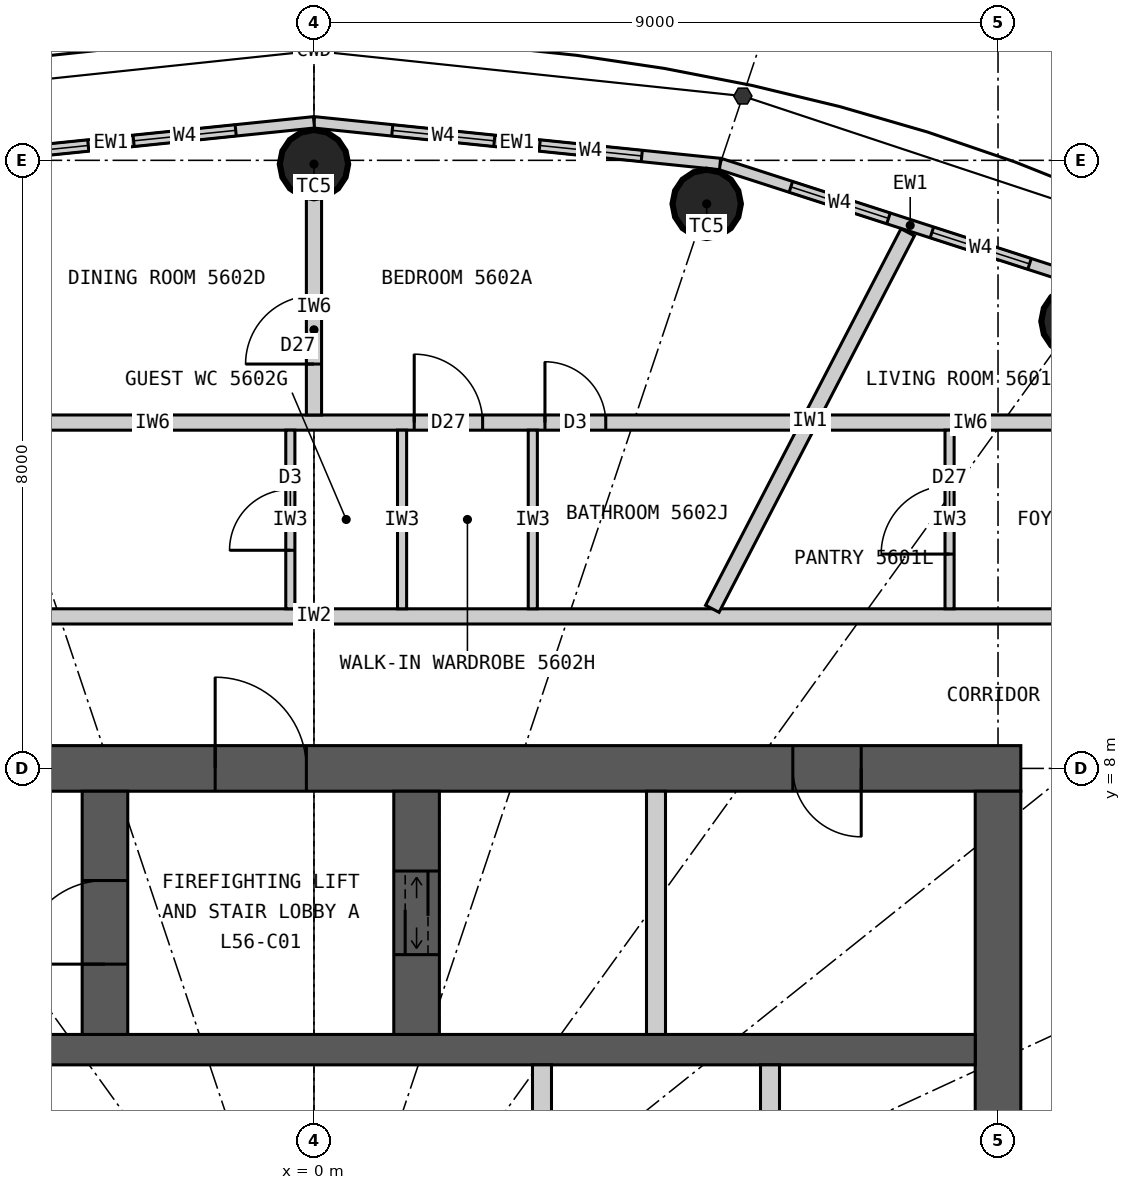
"""IFC4 building model, lengths in metres.
Left out: names, types, materials, properties, quantities, classifications, styles, units other than length and angle.
Written with IfcOpenShell. Run it as: python <this file> out.ifc"""

import sys

from ifc_helpers import new_model, si_unit, direction, frame, frame_2d, origin, origin_2d, place, context, subcontext, project, spatial, rectangle, circle, extrude, element, fill, save


model = new_model("IFC4")
c1 = context("Model", 3, precision=1e-05, world=origin(), true_north=direction((0.0, 1.0)))
c2 = subcontext(c1, "Body", "Model", "MODEL_VIEW")
j1 = project(units=[si_unit("LENGTHUNIT", "METRE"), si_unit("PLANEANGLEUNIT", "RADIAN")], contexts=[c1])
p1 = place(None, origin())
s1 = spatial("IfcSite", under=j1, at=p1, CompositionType="ELEMENT")
p2 = place(p1, origin())
s2 = spatial("IfcBuilding", under=s1, at=p2, CompositionType="ELEMENT")
p3 = place(p2, frame((0.0, 0.0, 209.4)))
s3 = spatial("IfcBuildingStorey", under=s2, at=p3, CompositionType="ELEMENT", Elevation=209.4)
for number, where, z_axis, x_axis in (
    (1, (10.019, 13.883, 0.0), (0.0, 0.0, 1.0), (1.0, 0.0, 0.0)),
    (2, (5.167, 15.427, 0.0), (0.0, 0.0, 1.0), (1.0, 0.0, 0.0)),
    (3, (0.0, 15.95, 0.0), (0.0, 0.0, 1.0), (1.0, 0.0, 0.0)),
):
    element("IfcColumn", number, at=place(p3, frame(where, z_axis=z_axis, x_axis=x_axis)), inside=s3, PredefinedType="COLUMN", context=c2, shape_type="SweptSolid", body=[
        extrude(circle(Radius=0.45, at=origin_2d()), origin(), (0.0, 0.0, 1.0), 3.3),
    ])
p4 = place(p3, frame((-9.3, 8.0, 0.0), z_axis=(0.0, 0.0, 1.0), x_axis=(1.0, 0.0, 0.0)))
e4 = element("IfcWall", 4, at=p4, inside=s3, PredefinedType="SHEAR", context=c2, shape_type="SweptSolid", body=[
    extrude(rectangle(XDim=18.6, YDim=0.6, at=frame_2d((9.3, 0.0))), origin(), (0.0, 0.0, 1.0), 3.3),
])
p5 = place(p4, frame((8.0, 0.0, 0.0)))
e5 = element("IfcOpeningElement", 5, at=p5, cuts=e4, PredefinedType="OPENING", context=c2, shape_type="SweptSolid", body=[
    extrude(rectangle(XDim=1.2, YDim=2.2, at=frame_2d((0.6, 1.1))), frame((0.0, 0.31, 0.0), z_axis=(0.0, -1.0, 0.0), x_axis=(1.0, 0.0, 0.0)), (0.0, 0.0, 1.0), 0.62),
])
p6 = place(p4, frame((15.6, 0.0, 0.0)))
e6 = element("IfcOpeningElement", 6, at=p6, cuts=e4, PredefinedType="OPENING", context=c2, shape_type="SweptSolid", body=[
    extrude(rectangle(XDim=0.9, YDim=2.2, at=frame_2d((0.45, 1.1))), frame((0.0, 0.31, 0.0), z_axis=(0.0, -1.0, 0.0), x_axis=(1.0, 0.0, 0.0)), (0.0, 0.0, 1.0), 0.62),
])
p7 = place(p3, frame((9.0, -7.7, 0.0), z_axis=(0.0, 0.0, 1.0), x_axis=(0.0, 1.0, 0.0)))
e7 = element("IfcWall", 7, at=p7, inside=s3, PredefinedType="SHEAR", context=c2, shape_type="SweptSolid", body=[
    extrude(rectangle(XDim=15.4, YDim=0.6, at=frame_2d((7.7, 0.0))), origin(), (0.0, 0.0, 1.0), 3.3),
])
p8 = place(p7, frame((6.8, 0.0, 0.0)))
e8 = element("IfcOpeningElement", 8, at=p8, cuts=e7, PredefinedType="OPENING", context=c2, shape_type="SweptSolid", body=[
    extrude(rectangle(XDim=1.8, YDim=2.2, at=frame_2d((0.9, 1.1))), frame((0.0, 0.31, 0.0), z_axis=(0.0, -1.0, 0.0), x_axis=(1.0, 0.0, 0.0)), (0.0, 0.0, 1.0), 0.62),
])
p9 = place(p3, frame((-8.7, 4.3, 0.0), z_axis=(0.0, 0.0, 1.0), x_axis=(1.0, 0.0, 0.0)))
e9 = element("IfcWall", 9, at=p9, inside=s3, PredefinedType="SHEAR", context=c2, shape_type="SweptSolid", body=[
    extrude(rectangle(XDim=17.4, YDim=0.4, at=frame_2d((8.7, 0.0))), origin(), (0.0, 0.0, 1.0), 3.3),
])
p10 = place(p3, frame((-2.75, 4.5, 0.0), z_axis=(0.0, 0.0, 1.0), x_axis=(0.0, 1.0, 0.0)))
e10 = element("IfcWall", 10, at=p10, inside=s3, PredefinedType="SHEAR", context=c2, shape_type="SweptSolid", body=[
    extrude(rectangle(XDim=3.2, YDim=0.6, at=frame_2d((1.6, 0.0))), origin(), (0.0, 0.0, 1.0), 3.3),
])
p11 = place(p10, frame((0.925, 0.0, 0.0)))
e11 = element("IfcOpeningElement", 11, at=p11, cuts=e10, PredefinedType="OPENING", context=c2, shape_type="SweptSolid", body=[
    extrude(rectangle(XDim=1.1, YDim=2.2, at=frame_2d((0.55, 1.1))), frame((0.0, 0.31, 0.0), z_axis=(0.0, -1.0, 0.0), x_axis=(1.0, 0.0, 0.0)), (0.0, 0.0, 1.0), 0.62),
])
p12 = place(p3, frame((1.35, 4.5, 0.0), z_axis=(0.0, 0.0, 1.0), x_axis=(0.0, 1.0, 0.0)))
e12 = element("IfcWall", 12, at=p12, inside=s3, PredefinedType="SHEAR", context=c2, shape_type="SweptSolid", body=[
    extrude(rectangle(XDim=3.2, YDim=0.6, at=frame_2d((1.6, 0.0))), origin(), (0.0, 0.0, 1.0), 3.3),
])
p13 = place(p12, frame((1.05, 0.0, 0.0)))
e13 = element("IfcOpeningElement", 13, at=p13, cuts=e12, PredefinedType="OPENING", context=c2, shape_type="SweptSolid", body=[
    extrude(rectangle(XDim=1.1, YDim=2.2, at=frame_2d((0.55, 1.1))), frame((0.0, 0.31, 0.0), z_axis=(0.0, -1.0, 0.0), x_axis=(1.0, 0.0, 0.0)), (0.0, 0.0, 1.0), 0.62),
])
p14 = place(p3, frame((4.5, 4.5, 0.0), z_axis=(0.0, 0.0, 1.0), x_axis=(0.0, 1.0, 0.0)))
e14 = element("IfcWall", 14, at=p14, inside=s3, PredefinedType="PARTITIONING", context=c2, shape_type="SweptSolid", body=[
    extrude(rectangle(XDim=3.2, YDim=0.25, at=frame_2d((1.6, 0.0))), origin(), (0.0, 0.0, 1.0), 3.3),
])
for number, where, z_axis, x_axis in (
    (15, (3.0, 1.75, 0.0), (0.0, 0.0, 1.0), (0.0, 1.0, 0.0)),
    (16, (6.0, 1.75, 0.0), (0.0, 0.0, 1.0), (0.0, 1.0, 0.0)),
):
    element("IfcWall", number, at=place(p3, frame(where, z_axis=z_axis, x_axis=x_axis)), inside=s3, PredefinedType="PARTITIONING", context=c2, shape_type="SweptSolid", body=[
        extrude(rectangle(XDim=2.35, YDim=0.25, at=frame_2d((1.175, 0.0))), origin(), (0.0, 0.0, 1.0), 3.3),
    ])
p15 = place(p3, frame((10.346, 14.336, 0.0), z_axis=(0.0, 0.0, 1.0), x_axis=(-0.951644702515, 0.307200846638, 0.0)))
e17 = element("IfcWall", 17, at=p15, inside=s3, PredefinedType="ELEMENTEDWALL", context=c2, shape_type="SweptSolid", body=[
    extrude(rectangle(XDim=5.258, YDim=0.15, at=frame_2d((2.629, 0.0))), origin(), (0.0, 0.0, 1.0), 3.12),
])
p16 = place(p15, frame((0.979, 0.0, 0.9)))
e18 = element("IfcOpeningElement", 18, at=p16, cuts=e17, PredefinedType="OPENING", context=c2, shape_type="SweptSolid", body=[
    extrude(rectangle(XDim=1.35, YDim=1.9, at=frame_2d((0.675, 0.95))), frame((0.0, 0.085, 0.0), z_axis=(0.0, -1.0, 0.0), x_axis=(1.0, 0.0, 0.0)), (0.0, 0.0, 1.0), 0.17),
])
p17 = place(p15, frame((2.929, 0.0, 0.9)))
e19 = element("IfcOpeningElement", 19, at=p17, cuts=e17, PredefinedType="OPENING", context=c2, shape_type="SweptSolid", body=[
    extrude(rectangle(XDim=1.35, YDim=1.9, at=frame_2d((0.675, 0.95))), frame((0.0, 0.085, 0.0), z_axis=(0.0, -1.0, 0.0), x_axis=(1.0, 0.0, 0.0)), (0.0, 0.0, 1.0), 0.17),
])
p18 = place(p3, frame((5.343, 15.952, 0.0), z_axis=(0.0, 0.0, 1.0), x_axis=(-0.994774574972, 0.102095763818, 0.0)))
e20 = element("IfcWall", 20, at=p18, inside=s3, PredefinedType="ELEMENTEDWALL", context=c2, shape_type="SweptSolid", body=[
    extrude(rectangle(XDim=5.371, YDim=0.15, at=frame_2d((2.686, 0.0))), origin(), (0.0, 0.0, 1.0), 3.12),
])
p19 = place(p18, frame((1.035, 0.0, 0.9)))
e21 = element("IfcOpeningElement", 21, at=p19, cuts=e20, PredefinedType="OPENING", context=c2, shape_type="SweptSolid", body=[
    extrude(rectangle(XDim=1.35, YDim=1.9, at=frame_2d((0.675, 0.95))), frame((0.0, 0.085, 0.0), z_axis=(0.0, -1.0, 0.0), x_axis=(1.0, 0.0, 0.0)), (0.0, 0.0, 1.0), 0.17),
])
p20 = place(p18, frame((2.985, 0.0, 0.9)))
e22 = element("IfcOpeningElement", 22, at=p20, cuts=e20, PredefinedType="OPENING", context=c2, shape_type="SweptSolid", body=[
    extrude(rectangle(XDim=1.35, YDim=1.9, at=frame_2d((0.675, 0.95))), frame((0.0, 0.085, 0.0), z_axis=(0.0, -1.0, 0.0), x_axis=(1.0, 0.0, 0.0)), (0.0, 0.0, 1.0), 0.17),
])
p21 = place(p3, frame((0.0, 16.5, 0.0), z_axis=(0.0, 0.0, 1.0), x_axis=(-0.994774574972, -0.102095763818, 0.0)))
e23 = element("IfcWall", 23, at=p21, inside=s3, PredefinedType="ELEMENTEDWALL", context=c2, shape_type="SweptSolid", body=[
    extrude(rectangle(XDim=5.371, YDim=0.15, at=frame_2d((2.686, 0.0))), origin(), (0.0, 0.0, 1.0), 3.12),
])
p22 = place(p21, frame((1.035, 0.0, 0.9)))
e24 = element("IfcOpeningElement", 24, at=p22, cuts=e23, PredefinedType="OPENING", context=c2, shape_type="SweptSolid", body=[
    extrude(rectangle(XDim=1.35, YDim=1.9, at=frame_2d((0.675, 0.95))), frame((0.0, 0.085, 0.0), z_axis=(0.0, -1.0, 0.0), x_axis=(1.0, 0.0, 0.0)), (0.0, 0.0, 1.0), 0.17),
])
p23 = place(p21, frame((2.985, 0.0, 0.9)))
e25 = element("IfcOpeningElement", 25, at=p23, cuts=e23, PredefinedType="OPENING", context=c2, shape_type="SweptSolid", body=[
    extrude(rectangle(XDim=1.35, YDim=1.9, at=frame_2d((0.675, 0.95))), frame((0.0, 0.085, 0.0), z_axis=(0.0, -1.0, 0.0), x_axis=(1.0, 0.0, 0.0)), (0.0, 0.0, 1.0), 0.17),
])
p24 = place(p3, frame((-11.1, 10.0, 0.0), z_axis=(0.0, 0.0, 1.0), x_axis=(1.0, 0.0, 0.0)))
e26 = element("IfcWall", 26, at=p24, inside=s3, PredefinedType="PARTITIONING", context=c2, shape_type="SweptSolid", body=[
    extrude(rectangle(XDim=22.2, YDim=0.2, at=frame_2d((11.1, 0.0))), origin(), (0.0, 0.0, 1.0), 3.12),
])
p25 = place(p24, frame((20.9, 0.0, 0.0)))
e27 = element("IfcOpeningElement", 27, at=p25, cuts=e26, PredefinedType="OPENING", context=c2, shape_type="SweptSolid", body=[
    extrude(rectangle(XDim=1.0, YDim=2.2, at=frame_2d((0.5, 1.1))), frame((0.0, 0.11, 0.0), z_axis=(0.0, -1.0, 0.0), x_axis=(1.0, 0.0, 0.0)), (0.0, 0.0, 1.0), 0.22),
])
p26 = place(p24, frame((4.329, 0.0, 0.0)))
e28 = element("IfcOpeningElement", 28, at=p26, cuts=e26, PredefinedType="OPENING", context=c2, shape_type="SweptSolid", body=[
    extrude(rectangle(XDim=1.0, YDim=2.2, at=frame_2d((0.5, 1.1))), frame((0.0, 0.11, 0.0), z_axis=(0.0, -1.0, 0.0), x_axis=(1.0, 0.0, 0.0)), (0.0, 0.0, 1.0), 0.22),
])
p27 = place(p3, frame((5.241, 10.1, 0.0), z_axis=(0.0, 0.0, 1.0), x_axis=(0.460603196597, 0.887606160008, 0.0)))
e29 = element("IfcWall", 29, at=p27, inside=s3, PredefinedType="PARTITIONING", context=c2, shape_type="SweptSolid", body=[
    extrude(rectangle(XDim=5.58, YDim=0.2, at=frame_2d((2.79, 0.0))), origin(), (0.0, 0.0, 1.0), 3.12),
])
p28 = place(p3, frame((10.609, 12.55, 0.0), z_axis=(0.0, 0.0, 1.0), x_axis=(-1.0, 0.0, 0.0)))
e30 = element("IfcWall", 30, at=p28, inside=s3, PredefinedType="PARTITIONING", context=c2, shape_type="SweptSolid", body=[
    extrude(rectangle(XDim=3.947, YDim=0.2, at=frame_2d((1.974, 0.0))), origin(), (0.0, 0.0, 1.0), 3.12),
])
p29 = place(p3, frame((8.363, 10.1, 0.0), z_axis=(0.0, 0.0, 1.0), x_axis=(0.0, 1.0, 0.0)))
e31 = element("IfcWall", 31, at=p29, inside=s3, PredefinedType="PARTITIONING", context=c2, shape_type="SweptSolid", body=[
    extrude(rectangle(XDim=2.35, YDim=0.12, at=frame_2d((1.175, 0.0))), origin(), (0.0, 0.0, 1.0), 3.12),
])
p30 = place(p29, frame((0.72, 0.0, 0.0)))
e32 = element("IfcOpeningElement", 32, at=p30, cuts=e31, PredefinedType="OPENING", context=c2, shape_type="SweptSolid", body=[
    extrude(rectangle(XDim=0.9, YDim=2.1, at=frame_2d((0.45, 1.05))), frame((0.0, 0.07, 0.0), z_axis=(0.0, -1.0, 0.0), x_axis=(1.0, 0.0, 0.0)), (0.0, 0.0, 1.0), 0.14),
])
p31 = place(p3, frame((6.364, 12.55, 0.0), z_axis=(0.0, 0.0, 1.0), x_axis=(-1.0, 0.0, 0.0)))
e33 = element("IfcWall", 33, at=p31, inside=s3, PredefinedType="PARTITIONING", context=c2, shape_type="SweptSolid", body=[
    extrude(rectangle(XDim=16.972, YDim=0.2, at=frame_2d((8.486, 0.0))), origin(), (0.0, 0.0, 1.0), 3.12),
])
p32 = place(p31, frame((2.525, 0.0, 0.0)))
e34 = element("IfcOpeningElement", 34, at=p32, cuts=e33, PredefinedType="OPENING", context=c2, shape_type="SweptSolid", body=[
    extrude(rectangle(XDim=0.8, YDim=2.1, at=frame_2d((0.4, 1.05))), frame((0.0, 0.11, 0.0), z_axis=(0.0, -1.0, 0.0), x_axis=(1.0, 0.0, 0.0)), (0.0, 0.0, 1.0), 0.22),
])
p33 = place(p31, frame((4.145, 0.0, 0.0)))
e35 = element("IfcOpeningElement", 35, at=p33, cuts=e33, PredefinedType="OPENING", context=c2, shape_type="SweptSolid", body=[
    extrude(rectangle(XDim=0.9, YDim=2.1, at=frame_2d((0.45, 1.05))), frame((0.0, 0.11, 0.0), z_axis=(0.0, -1.0, 0.0), x_axis=(1.0, 0.0, 0.0)), (0.0, 0.0, 1.0), 0.22),
])
p34 = place(p31, frame((13.52, 0.0, 0.0)))
e36 = element("IfcOpeningElement", 36, at=p34, cuts=e33, PredefinedType="OPENING", context=c2, shape_type="SweptSolid", body=[
    extrude(rectangle(XDim=0.9, YDim=2.1, at=frame_2d((0.45, 1.05))), frame((0.0, 0.11, 0.0), z_axis=(0.0, -1.0, 0.0), x_axis=(1.0, 0.0, 0.0)), (0.0, 0.0, 1.0), 0.22),
])
p35 = place(p3, frame((0.0, 12.65, 0.0), z_axis=(0.0, 0.0, 1.0), x_axis=(0.0, 1.0, 0.0)))
e37 = element("IfcWall", 37, at=p35, inside=s3, PredefinedType="PARTITIONING", context=c2, shape_type="SweptSolid", body=[
    extrude(rectangle(XDim=2.85, YDim=0.2, at=frame_2d((1.425, 0.0))), origin(), (0.0, 0.0, 1.0), 2.42),
])
p36 = place(p35, frame((0.67, 0.0, 0.0)))
e38 = element("IfcOpeningElement", 38, at=p36, cuts=e37, PredefinedType="OPENING", context=c2, shape_type="SweptSolid", body=[
    extrude(rectangle(XDim=0.9, YDim=2.1, at=frame_2d((0.45, 1.05))), frame((0.0, 0.11, 0.0), z_axis=(0.0, -1.0, 0.0), x_axis=(1.0, 0.0, 0.0)), (0.0, 0.0, 1.0), 0.22),
])
for number, where, z_axis, x_axis in (
    (39, (2.879, 10.1, 0.0), (0.0, 0.0, 1.0), (0.0, 1.0, 0.0)),
    (40, (1.159, 10.1, 0.0), (0.0, 0.0, 1.0), (0.0, 1.0, 0.0)),
):
    element("IfcWall", number, at=place(p3, frame(where, z_axis=z_axis, x_axis=x_axis)), inside=s3, PredefinedType="PARTITIONING", context=c2, shape_type="SweptSolid", body=[
        extrude(rectangle(XDim=2.35, YDim=0.12, at=frame_2d((1.175, 0.0))), origin(), (0.0, 0.0, 1.0), 3.12),
    ])
p37 = place(p3, frame((-0.311, 10.1, 0.0), z_axis=(0.0, 0.0, 1.0), x_axis=(0.0, 1.0, 0.0)))
e41 = element("IfcWall", 41, at=p37, inside=s3, PredefinedType="PARTITIONING", context=c2, shape_type="SweptSolid", body=[
    extrude(rectangle(XDim=2.35, YDim=0.12, at=frame_2d((1.175, 0.0))), origin(), (0.0, 0.0, 1.0), 3.12),
])
p38 = place(p37, frame((0.77, 0.0, 0.0)))
e42 = element("IfcOpeningElement", 42, at=p38, cuts=e41, PredefinedType="OPENING", context=c2, shape_type="SweptSolid", body=[
    extrude(rectangle(XDim=0.8, YDim=2.1, at=frame_2d((0.4, 1.05))), frame((0.0, 0.07, 0.0), z_axis=(0.0, -1.0, 0.0), x_axis=(1.0, 0.0, 0.0)), (0.0, 0.0, 1.0), 0.14),
])
p39 = place(p16, origin())
e43 = element("IfcWindow", 43, at=p39, inside=s3, PartitioningType="SINGLE_PANEL", PredefinedType="WINDOW", context=c2, shape_type="SweptSolid", body=[
    extrude(rectangle(XDim=1.35, YDim=1.9, at=frame_2d((0.675, 0.95))), frame((0.0, 0.03, 0.0), z_axis=(0.0, -1.0, 0.0), x_axis=(1.0, 0.0, 0.0)), (0.0, 0.0, 1.0), 0.06),
])
fill(e18, e43)
p40 = place(p17, origin())
e44 = element("IfcWindow", 44, at=p40, inside=s3, PartitioningType="SINGLE_PANEL", PredefinedType="WINDOW", context=c2, shape_type="SweptSolid", body=[
    extrude(rectangle(XDim=1.35, YDim=1.9, at=frame_2d((0.675, 0.95))), frame((0.0, 0.03, 0.0), z_axis=(0.0, -1.0, 0.0), x_axis=(1.0, 0.0, 0.0)), (0.0, 0.0, 1.0), 0.06),
])
fill(e19, e44)
p41 = place(p19, origin())
e45 = element("IfcWindow", 45, at=p41, inside=s3, PartitioningType="SINGLE_PANEL", PredefinedType="WINDOW", context=c2, shape_type="SweptSolid", body=[
    extrude(rectangle(XDim=1.35, YDim=1.9, at=frame_2d((0.675, 0.95))), frame((0.0, 0.03, 0.0), z_axis=(0.0, -1.0, 0.0), x_axis=(1.0, 0.0, 0.0)), (0.0, 0.0, 1.0), 0.06),
])
fill(e21, e45)
p42 = place(p20, origin())
e46 = element("IfcWindow", 46, at=p42, inside=s3, PartitioningType="SINGLE_PANEL", PredefinedType="WINDOW", context=c2, shape_type="SweptSolid", body=[
    extrude(rectangle(XDim=1.35, YDim=1.9, at=frame_2d((0.675, 0.95))), frame((0.0, 0.03, 0.0), z_axis=(0.0, -1.0, 0.0), x_axis=(1.0, 0.0, 0.0)), (0.0, 0.0, 1.0), 0.06),
])
fill(e22, e46)
p43 = place(p22, origin())
e47 = element("IfcWindow", 47, at=p43, inside=s3, PartitioningType="SINGLE_PANEL", PredefinedType="WINDOW", context=c2, shape_type="SweptSolid", body=[
    extrude(rectangle(XDim=1.35, YDim=1.9, at=frame_2d((0.675, 0.95))), frame((0.0, 0.03, 0.0), z_axis=(0.0, -1.0, 0.0), x_axis=(1.0, 0.0, 0.0)), (0.0, 0.0, 1.0), 0.06),
])
fill(e24, e47)
p44 = place(p23, origin())
e48 = element("IfcWindow", 48, at=p44, inside=s3, PartitioningType="SINGLE_PANEL", PredefinedType="WINDOW", context=c2, shape_type="SweptSolid", body=[
    extrude(rectangle(XDim=1.35, YDim=1.9, at=frame_2d((0.675, 0.95))), frame((0.0, 0.03, 0.0), z_axis=(0.0, -1.0, 0.0), x_axis=(1.0, 0.0, 0.0)), (0.0, 0.0, 1.0), 0.06),
])
fill(e25, e48)
p45 = place(p30, origin())
e49 = element("IfcDoor", 49, at=p45, inside=s3, OperationType="SINGLE_SWING_LEFT", PredefinedType="DOOR", context=c2, shape_type="SweptSolid", body=[
    extrude(rectangle(XDim=0.9, YDim=2.1, at=frame_2d((0.45, 1.05))), frame((0.0, 0.025, 0.0), z_axis=(0.0, -1.0, 0.0), x_axis=(1.0, 0.0, 0.0)), (0.0, 0.0, 1.0), 0.05),
])
fill(e32, e49)
p46 = place(p32, origin())
e50 = element("IfcDoor", 50, at=p46, inside=s3, OperationType="SINGLE_SWING_RIGHT", PredefinedType="DOOR", context=c2, shape_type="SweptSolid", body=[
    extrude(rectangle(XDim=0.8, YDim=2.1, at=frame_2d((0.4, 1.05))), frame((0.0, 0.025, 0.0), z_axis=(0.0, -1.0, 0.0), x_axis=(1.0, 0.0, 0.0)), (0.0, 0.0, 1.0), 0.05),
])
fill(e34, e50)
p47 = place(p33, origin())
e51 = element("IfcDoor", 51, at=p47, inside=s3, OperationType="SINGLE_SWING_RIGHT", PredefinedType="DOOR", context=c2, shape_type="SweptSolid", body=[
    extrude(rectangle(XDim=0.9, YDim=2.1, at=frame_2d((0.45, 1.05))), frame((0.0, 0.025, 0.0), z_axis=(0.0, -1.0, 0.0), x_axis=(1.0, 0.0, 0.0)), (0.0, 0.0, 1.0), 0.05),
])
fill(e35, e51)
p48 = place(p38, origin())
e52 = element("IfcDoor", 52, at=p48, inside=s3, OperationType="SINGLE_SWING_LEFT", PredefinedType="DOOR", context=c2, shape_type="SweptSolid", body=[
    extrude(rectangle(XDim=0.8, YDim=2.1, at=frame_2d((0.4, 1.05))), frame((0.0, 0.025, 0.0), z_axis=(0.0, -1.0, 0.0), x_axis=(1.0, 0.0, 0.0)), (0.0, 0.0, 1.0), 0.05),
])
fill(e42, e52)
p49 = place(p36, origin())
e53 = element("IfcDoor", 53, at=p49, inside=s3, OperationType="SINGLE_SWING_LEFT", PredefinedType="DOOR", context=c2, shape_type="SweptSolid", body=[
    extrude(rectangle(XDim=0.9, YDim=2.1, at=frame_2d((0.45, 1.05))), frame((0.0, 0.025, 0.0), z_axis=(0.0, -1.0, 0.0), x_axis=(1.0, 0.0, 0.0)), (0.0, 0.0, 1.0), 0.05),
])
fill(e38, e53)
p50 = place(p5, origin())
e54 = element("IfcDoor", 54, at=p50, inside=s3, OperationType="SINGLE_SWING_LEFT", PredefinedType="DOOR", context=c2, shape_type="SweptSolid", body=[
    extrude(rectangle(XDim=1.2, YDim=2.2, at=frame_2d((0.6, 1.1))), frame((0.0, 0.025, 0.0), z_axis=(0.0, -1.0, 0.0), x_axis=(1.0, 0.0, 0.0)), (0.0, 0.0, 1.0), 0.05),
])
fill(e5, e54)
p51 = place(p11, origin())
e55 = element("IfcDoor", 55, at=p51, inside=s3, OperationType="SINGLE_SWING_LEFT", PredefinedType="DOOR", context=c2, shape_type="SweptSolid", body=[
    extrude(rectangle(XDim=1.1, YDim=2.2, at=frame_2d((0.55, 1.1))), frame((0.0, 0.025, 0.0), z_axis=(0.0, -1.0, 0.0), x_axis=(1.0, 0.0, 0.0)), (0.0, 0.0, 1.0), 0.05),
])
fill(e11, e55)
p52 = place(p13, origin())
e56 = element("IfcDoor", 56, at=p52, inside=s3, OperationType="DOUBLE_DOOR_SLIDING", PredefinedType="DOOR", context=c2, shape_type="SweptSolid", body=[
    extrude(rectangle(XDim=1.1, YDim=2.2, at=frame_2d((0.55, 1.1))), frame((0.0, 0.025, 0.0), z_axis=(0.0, -1.0, 0.0), x_axis=(1.0, 0.0, 0.0)), (0.0, 0.0, 1.0), 0.05),
])
fill(e13, e56)
p53 = place(p6, origin())
e57 = element("IfcDoor", 57, at=p53, inside=s3, OperationType="SINGLE_SWING_RIGHT", PredefinedType="DOOR", context=c2, shape_type="SweptSolid", body=[
    extrude(rectangle(XDim=0.9, YDim=2.2, at=frame_2d((0.45, 1.1))), frame((0.0, 0.025, 0.0), z_axis=(0.0, -1.0, 0.0), x_axis=(1.0, 0.0, 0.0)), (0.0, 0.0, 1.0), 0.05),
])
fill(e6, e57)
save(model, sys.argv[1])
